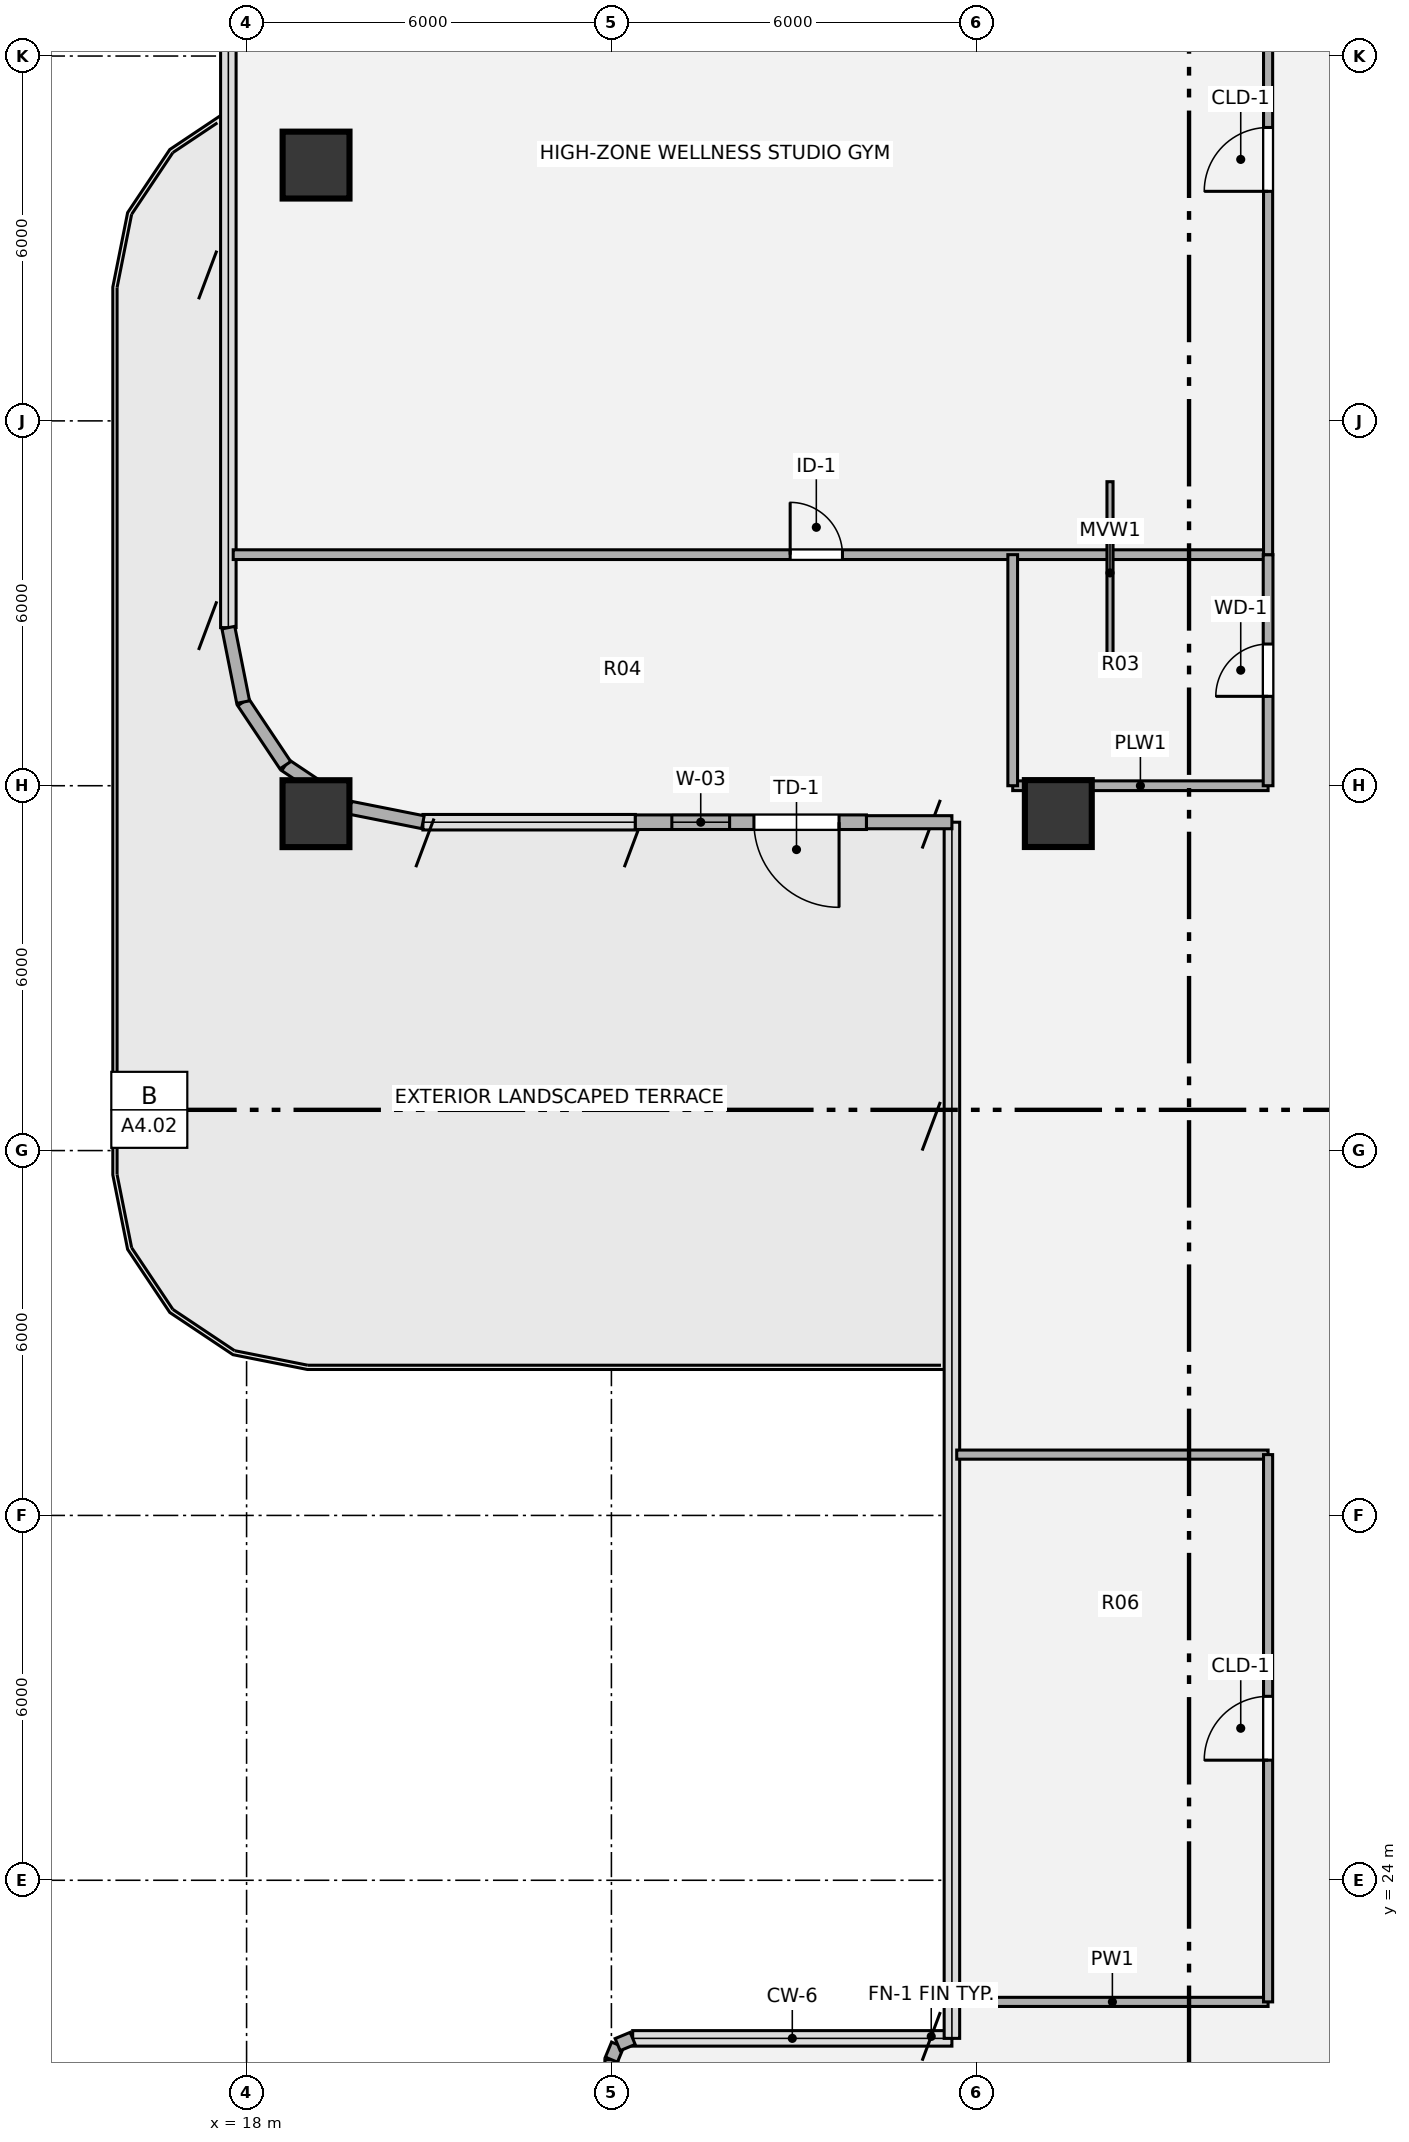
"""IFC4 building model, lengths in metres.
Left out: names, types, materials, properties, quantities, classifications, styles, units other than length and angle.
Written with IfcOpenShell. Run it as: python <this file> out.ifc"""

import sys

from ifc_helpers import new_model, si_unit, direction, frame, frame_2d, origin, origin_2d, place, context, subcontext, project, spatial, rectangle, hollow_circle, extrude, source, transform, mapped, element, fill, save


model = new_model("IFC4")
c1 = context("Model", 3, precision=1e-05, world=origin(), true_north=direction((0.0, 1.0)))
c2 = subcontext(c1, "Body", "Model", "MODEL_VIEW")
j1 = project(units=[si_unit("LENGTHUNIT", "METRE"), si_unit("PLANEANGLEUNIT", "RADIAN")], contexts=[c1])
p1 = place(None, origin())
s1 = spatial("IfcSite", under=j1, at=p1, CompositionType="ELEMENT")
p2 = place(p1, origin())
s2 = spatial("IfcBuilding", under=s1, at=p2, CompositionType="ELEMENT")
p3 = place(p2, frame((0.0, 0.0, 218.52)))
s3 = spatial("IfcBuildingStorey", under=s2, at=p3, CompositionType="ELEMENT", Elevation=218.52)
m1 = source(origin(), c2, "Body", "SweptSolid", [
    extrude(hollow_circle(Radius=0.55, WallThickness=0.04, at=origin_2d()), origin(), (0.0, 0.0, 1.0), 5.049),
])
p4 = place(p3, frame((18.786, 39.859, 0.0), z_axis=(0.140579075129, 0.665997599821, 0.73258768804), x_axis=(-0.978440346297, 0.206529631621, 0.0)))
e1 = element("IfcColumn", 1, at=p4, inside=s3, PredefinedType="COLUMN", context=c2, shape_type="MappedRepresentation", body=[
    mapped(m1, transform((0.0, 0.0, 0.0), x_axis=(1.0, 0.0, 0.0), y_axis=(0.0, 1.0, 0.0), z_axis=(0.0, 0.0, 1.0), scale=1.0)),
])
m2 = source(origin(), c2, "Body", "SweptSolid", [
    extrude(hollow_circle(Radius=0.55, WallThickness=0.04, at=origin_2d()), origin(), (0.0, 0.0, 1.0), 4.92),
])
p5 = place(p3, frame((18.786, 50.632, 0.0), z_axis=(0.144797912538, 0.640177474177, 0.754457663545), x_axis=(-0.975361817364, 0.220611253629, 0.0)))
e2 = element("IfcColumn", 2, at=p5, inside=s3, PredefinedType="COLUMN", context=c2, shape_type="MappedRepresentation", body=[
    mapped(m2, transform((0.0, 0.0, 0.0), x_axis=(1.0, 0.0, 0.0), y_axis=(0.0, 1.0, 0.0), z_axis=(0.0, 0.0, 1.0), scale=1.0)),
])
m3 = source(origin(), c2, "Body", "SweptSolid", [
    extrude(hollow_circle(Radius=0.55, WallThickness=0.04, at=origin_2d()), origin(), (0.0, 0.0, 1.0), 5.004),
])
p6 = place(p3, frame((31.35, 39.859, 0.0), z_axis=(0.0, 0.672694647561, 0.739920205929), x_axis=(-1.0, 0.0, 0.0)))
e3 = element("IfcColumn", 3, at=p6, inside=s3, PredefinedType="COLUMN", context=c2, shape_type="MappedRepresentation", body=[
    mapped(m3, transform((0.0, 0.0, 0.0), x_axis=(1.0, 0.0, 0.0), y_axis=(0.0, 1.0, 0.0), z_axis=(0.0, 0.0, 1.0), scale=1.0)),
])
p7 = place(p3, frame((24.0, 18.28, 0.0), z_axis=(0.0, 0.0, 1.0), x_axis=(0.0, 1.0, 0.0)))
e4 = element("IfcWall", 4, at=p7, inside=s3, PredefinedType="SOLIDWALL", context=c2, shape_type="SweptSolid", body=[
    extrude(rectangle(XDim=2.77, YDim=0.215, at=frame_2d((1.385, 0.0))), origin(), (0.0, 0.0, 1.0), 2.28),
])
p8 = place(p3, frame((24.0, 21.05, 0.0), z_axis=(0.0, 0.0, 1.0), x_axis=(0.382673670509, 0.923883575944, 0.0)))
e5 = element("IfcWall", 5, at=p8, inside=s3, PredefinedType="SOLIDWALL", context=c2, shape_type="SweptSolid", body=[
    extrude(rectangle(XDim=0.268, YDim=0.215, at=frame_2d((0.134, 0.0))), origin(), (0.0, 0.0, 1.0), 4.092),
])
p9 = place(p3, frame((24.103, 21.298, 0.0), z_axis=(0.0, 0.0, 1.0), x_axis=(0.924205486139, 0.381895560841, 0.0)))
e6 = element("IfcWall", 6, at=p9, inside=s3, PredefinedType="SOLIDWALL", context=c2, shape_type="SweptSolid", body=[
    extrude(rectangle(XDim=0.268, YDim=0.215, at=frame_2d((0.134, 0.0))), origin(), (0.0, 0.0, 1.0), 4.092),
])
p10 = place(p3, frame((29.6, 41.4, 0.0), z_axis=(0.0, 0.0, 1.0), x_axis=(-1.0, 0.0, 0.0)))
e7 = element("IfcWall", 7, at=p10, inside=s3, PredefinedType="SOLIDWALL", context=c2, shape_type="SweptSolid", body=[
    extrude(rectangle(XDim=1.406, YDim=0.215, at=frame_2d((0.703, 0.0))), origin(), (0.0, 0.0, 1.0), 4.092),
])
p11 = place(p3, frame((28.194, 41.4, 0.0), z_axis=(0.0, 0.0, 1.0), x_axis=(-1.0, 0.0, 0.0)))
e8 = element("IfcWall", 8, at=p11, inside=s3, PredefinedType="SOLIDWALL", context=c2, shape_type="SweptSolid", body=[
    extrude(rectangle(XDim=3.8, YDim=0.24, at=frame_2d((1.9, 0.0))), origin(), (0.0, 0.0, 1.0), 4.092),
])
p12 = place(p11, frame((0.45, 0.0, 0.0)))
e9 = element("IfcOpeningElement", 9, at=p12, cuts=e8, PredefinedType="OPENING", context=c2, shape_type="SweptSolid", body=[
    extrude(rectangle(XDim=1.4, YDim=2.15, at=origin_2d()), frame((0.7, 0.13, 1.075), z_axis=(0.0, -1.0, 0.0), x_axis=(1.0, 0.0, 0.0)), (0.0, 0.0, 1.0), 0.26),
])
p13 = place(p11, frame((2.25, 0.0, 0.85)))
e10 = element("IfcOpeningElement", 10, at=p13, cuts=e8, PredefinedType="OPENING", context=c2, shape_type="SweptSolid", body=[
    extrude(rectangle(XDim=0.95, YDim=1.35, at=origin_2d()), frame((0.475, 0.13, 0.675), z_axis=(0.0, -1.0, 0.0), x_axis=(1.0, 0.0, 0.0)), (0.0, 0.0, 1.0), 0.26),
])
for number, where, z_axis, x_axis in (
    (11, (20.9, 41.4, 0.0), (0.0, 0.0, 1.0), (-0.981, 0.195, 0.0)),
    (12, (19.675, 41.644, 0.0), (0.0, 0.0, 1.0), (-0.831, 0.556, 0.0)),
    (13, (18.637, 42.337, 0.0), (0.0, 0.0, 1.0), (-0.556, 0.831, 0.0)),
    (14, (17.944, 43.375, 0.0), (0.0, 0.0, 1.0), (-0.195, 0.981, 0.0)),
):
    element("IfcWall", number, at=place(p3, frame(where, z_axis=z_axis, x_axis=x_axis)), inside=s3, PredefinedType="SOLIDWALL", context=c2, shape_type="SweptSolid", body=[
        extrude(rectangle(XDim=1.249, YDim=0.215, at=frame_2d((0.624, 0.0))), origin(), (0.0, 0.0, 1.0), 4.092),
    ])
p14 = place(p3, frame((29.678, 22.0, 0.0), z_axis=(0.0, 0.0, 1.0), x_axis=(1.0, 0.0, 0.0)))
e15 = element("IfcWall", 15, at=p14, inside=s3, PredefinedType="PARTITIONING", context=c2, shape_type="SweptSolid", body=[
    extrude(rectangle(XDim=5.122, YDim=0.15, at=frame_2d((2.561, 0.0))), origin(), (0.0, 0.0, 1.0), 4.062),
])
p15 = place(p3, frame((29.679, 31.0, 0.0), z_axis=(0.0, 0.0, 1.0), x_axis=(1.0, 0.0, 0.0)))
e16 = element("IfcWall", 16, at=p15, inside=s3, PredefinedType="PARTITIONING", context=c2, shape_type="SweptSolid", body=[
    extrude(rectangle(XDim=5.121, YDim=0.15, at=frame_2d((2.561, 0.0))), origin(), (0.0, 0.0, 1.0), 4.062),
])
p16 = place(p3, frame((30.6, 42.0, 0.0), z_axis=(0.0, 0.0, 1.0), x_axis=(1.0, 0.0, 0.0)))
e17 = element("IfcWall", 17, at=p16, inside=s3, PredefinedType="PLUMBINGWALL", context=c2, shape_type="SweptSolid", body=[
    extrude(rectangle(XDim=4.2, YDim=0.16, at=frame_2d((2.1, 0.0))), origin(), (0.0, 0.0, 1.0), 4.062),
])
p17 = place(p3, frame((17.78, 45.8, 0.0), z_axis=(0.0, 0.0, 1.0), x_axis=(1.0, 0.0, 0.0)))
e18 = element("IfcWall", 18, at=p17, inside=s3, PredefinedType="PLUMBINGWALL", context=c2, shape_type="SweptSolid", body=[
    extrude(rectangle(XDim=17.02, YDim=0.16, at=frame_2d((8.51, 0.0))), origin(), (0.0, 0.0, 1.0), 3.544),
])
p18 = place(p17, frame((9.16, 0.0, 0.0)))
e19 = element("IfcOpeningElement", 19, at=p18, cuts=e18, PredefinedType="OPENING", context=c2, shape_type="SweptSolid", body=[
    extrude(rectangle(XDim=0.86, YDim=2.1, at=origin_2d()), frame((0.43, 0.09, 1.05), z_axis=(0.0, -1.0, 0.0), x_axis=(1.0, 0.0, 0.0)), (0.0, 0.0, 1.0), 0.18),
])
p19 = place(p3, frame((30.6, 42.0, 0.0), z_axis=(0.0, 0.0, 1.0), x_axis=(0.0, 1.0, 0.0)))
e20 = element("IfcWall", 20, at=p19, inside=s3, PredefinedType="PLUMBINGWALL", context=c2, shape_type="SweptSolid", body=[
    extrude(rectangle(XDim=3.8, YDim=0.16, at=frame_2d((1.9, 0.0))), origin(), (0.0, 0.0, 1.0), 4.062),
])
p20 = place(p3, frame((34.8, 22.0, 0.0), z_axis=(0.0, 0.0, 1.0), x_axis=(0.0, 1.0, 0.0)))
e21 = element("IfcWall", 21, at=p20, inside=s3, PredefinedType="PARTITIONING", context=c2, shape_type="SweptSolid", body=[
    extrude(rectangle(XDim=9.0, YDim=0.15, at=frame_2d((4.5, 0.0))), origin(), (0.0, 0.0, 1.0), 4.062),
])
p21 = place(p20, frame((3.975, 0.0, 0.0)))
e22 = element("IfcOpeningElement", 22, at=p21, cuts=e21, PredefinedType="OPENING", context=c2, shape_type="SweptSolid", body=[
    extrude(rectangle(XDim=1.05, YDim=2.1, at=origin_2d()), frame((0.525, 0.085, 1.05), z_axis=(0.0, -1.0, 0.0), x_axis=(1.0, 0.0, 0.0)), (0.0, 0.0, 1.0), 0.17),
])
p22 = place(p3, frame((34.8, 42.0, 0.0), z_axis=(0.0, 0.0, 1.0), x_axis=(0.0, 1.0, 0.0)))
e23 = element("IfcWall", 23, at=p22, inside=s3, PredefinedType="PLUMBINGWALL", context=c2, shape_type="SweptSolid", body=[
    extrude(rectangle(XDim=3.8, YDim=0.16, at=frame_2d((1.9, 0.0))), origin(), (0.0, 0.0, 1.0), 4.062),
])
p23 = place(p22, frame((1.47, 0.0, 0.0)))
e24 = element("IfcOpeningElement", 24, at=p23, cuts=e23, PredefinedType="OPENING", context=c2, shape_type="SweptSolid", body=[
    extrude(rectangle(XDim=0.86, YDim=2.1, at=origin_2d()), frame((0.43, 0.09, 1.05), z_axis=(0.0, -1.0, 0.0), x_axis=(1.0, 0.0, 0.0)), (0.0, 0.0, 1.0), 0.18),
])
p24 = place(p3, frame((34.8, 45.8, 0.0), z_axis=(0.0, 0.0, 1.0), x_axis=(0.0, 1.0, 0.0)))
e25 = element("IfcWall", 25, at=p24, inside=s3, PredefinedType="PARTITIONING", context=c2, shape_type="SweptSolid", body=[
    extrude(rectangle(XDim=12.8, YDim=0.15, at=frame_2d((6.4, 0.0))), origin(), (0.0, 0.0, 1.0), 4.062),
])
p25 = place(p24, frame((5.975, 0.0, 0.0)))
e26 = element("IfcOpeningElement", 26, at=p25, cuts=e25, PredefinedType="OPENING", context=c2, shape_type="SweptSolid", body=[
    extrude(rectangle(XDim=1.05, YDim=2.1, at=origin_2d()), frame((0.525, 0.085, 1.05), z_axis=(0.0, -1.0, 0.0), x_axis=(1.0, 0.0, 0.0)), (0.0, 0.0, 1.0), 0.17),
])
p26 = place(p3, frame((32.2, 44.0, 0.0), z_axis=(0.0, 0.0, 1.0), x_axis=(0.0, 1.0, 0.0)))
e27 = element("IfcWall", 27, at=p26, inside=s3, PredefinedType="MOVABLE", context=c2, shape_type="SweptSolid", body=[
    extrude(rectangle(XDim=3.0, YDim=0.1, at=frame_2d((1.5, 0.0))), origin(), (0.0, 0.0, 1.0), 2.85),
])
m4 = source(origin(), c2, "Body", "SweptSolid", [
    extrude(rectangle(XDim=1.4, YDim=2.15, at=origin_2d()), frame((0.7, 0.025, 1.075), z_axis=(0.0, -1.0, 0.0), x_axis=(1.0, 0.0, 0.0)), (0.0, 0.0, 1.0), 0.05),
])
p27 = place(p12, origin())
e28 = element("IfcDoor", 28, at=p27, inside=s3, OperationType="SINGLE_SWING_LEFT", PredefinedType="DOOR", context=c2, shape_type="MappedRepresentation", body=[
    mapped(m4, transform((0.0, 0.0, 0.0), x_axis=(1.0, 0.0, 0.0), y_axis=(0.0, 1.0, 0.0), z_axis=(0.0, 0.0, 1.0), scale=1.0)),
])
fill(e9, e28)
m5 = source(origin(), c2, "Body", "SweptSolid", [
    extrude(rectangle(XDim=0.95, YDim=1.35, at=origin_2d()), frame((0.475, 0.03, 0.675), z_axis=(0.0, -1.0, 0.0), x_axis=(1.0, 0.0, 0.0)), (0.0, 0.0, 1.0), 0.06),
])
p28 = place(p13, origin())
e29 = element("IfcWindow", 29, at=p28, inside=s3, PartitioningType="SINGLE_PANEL", PredefinedType="WINDOW", context=c2, shape_type="MappedRepresentation", body=[
    mapped(m5, transform((0.0, 0.0, 0.0), x_axis=(1.0, 0.0, 0.0), y_axis=(0.0, 1.0, 0.0), z_axis=(0.0, 0.0, 1.0), scale=1.0)),
])
fill(e10, e29)
m6 = source(origin(), c2, "Body", "SweptSolid", [
    extrude(rectangle(XDim=0.86, YDim=2.1, at=origin_2d()), frame((0.43, 0.025, 1.05), z_axis=(0.0, -1.0, 0.0), x_axis=(1.0, 0.0, 0.0)), (0.0, 0.0, 1.0), 0.05),
])
p29 = place(p18, origin())
e30 = element("IfcDoor", 30, at=p29, inside=s3, OperationType="SINGLE_SWING_LEFT", PredefinedType="DOOR", context=c2, shape_type="MappedRepresentation", body=[
    mapped(m6, transform((0.0, 0.0, 0.0), x_axis=(1.0, 0.0, 0.0), y_axis=(0.0, 1.0, 0.0), z_axis=(0.0, 0.0, 1.0), scale=1.0)),
])
fill(e19, e30)
m7 = source(origin(), c2, "Body", "SweptSolid", [
    extrude(rectangle(XDim=1.05, YDim=2.1, at=origin_2d()), frame((0.525, 0.025, 1.05), z_axis=(0.0, -1.0, 0.0), x_axis=(1.0, 0.0, 0.0)), (0.0, 0.0, 1.0), 0.05),
])
p30 = place(p21, origin())
e31 = element("IfcDoor", 31, at=p30, inside=s3, OperationType="SINGLE_SWING_LEFT", PredefinedType="DOOR", context=c2, shape_type="MappedRepresentation", body=[
    mapped(m7, transform((0.0, 0.0, 0.0), x_axis=(1.0, 0.0, 0.0), y_axis=(0.0, 1.0, 0.0), z_axis=(0.0, 0.0, 1.0), scale=1.0)),
])
fill(e22, e31)
m8 = source(origin(), c2, "Body", "SweptSolid", [
    extrude(rectangle(XDim=0.86, YDim=2.1, at=origin_2d()), frame((0.43, 0.025, 1.05), z_axis=(0.0, -1.0, 0.0), x_axis=(1.0, 0.0, 0.0)), (0.0, 0.0, 1.0), 0.05),
])
p31 = place(p23, origin())
e32 = element("IfcDoor", 32, at=p31, inside=s3, OperationType="SINGLE_SWING_LEFT", PredefinedType="DOOR", context=c2, shape_type="MappedRepresentation", body=[
    mapped(m8, transform((0.0, 0.0, 0.0), x_axis=(1.0, 0.0, 0.0), y_axis=(0.0, 1.0, 0.0), z_axis=(0.0, 0.0, 1.0), scale=1.0)),
])
fill(e24, e32)
p32 = place(p25, origin())
e33 = element("IfcDoor", 33, at=p32, inside=s3, OperationType="SINGLE_SWING_LEFT", PredefinedType="DOOR", context=c2, shape_type="MappedRepresentation", body=[
    mapped(m7, transform((0.0, 0.0, 0.0), x_axis=(1.0, 0.0, 0.0), y_axis=(0.0, 1.0, 0.0), z_axis=(0.0, 0.0, 1.0), scale=1.0)),
])
fill(e26, e33)
save(model, sys.argv[1])
